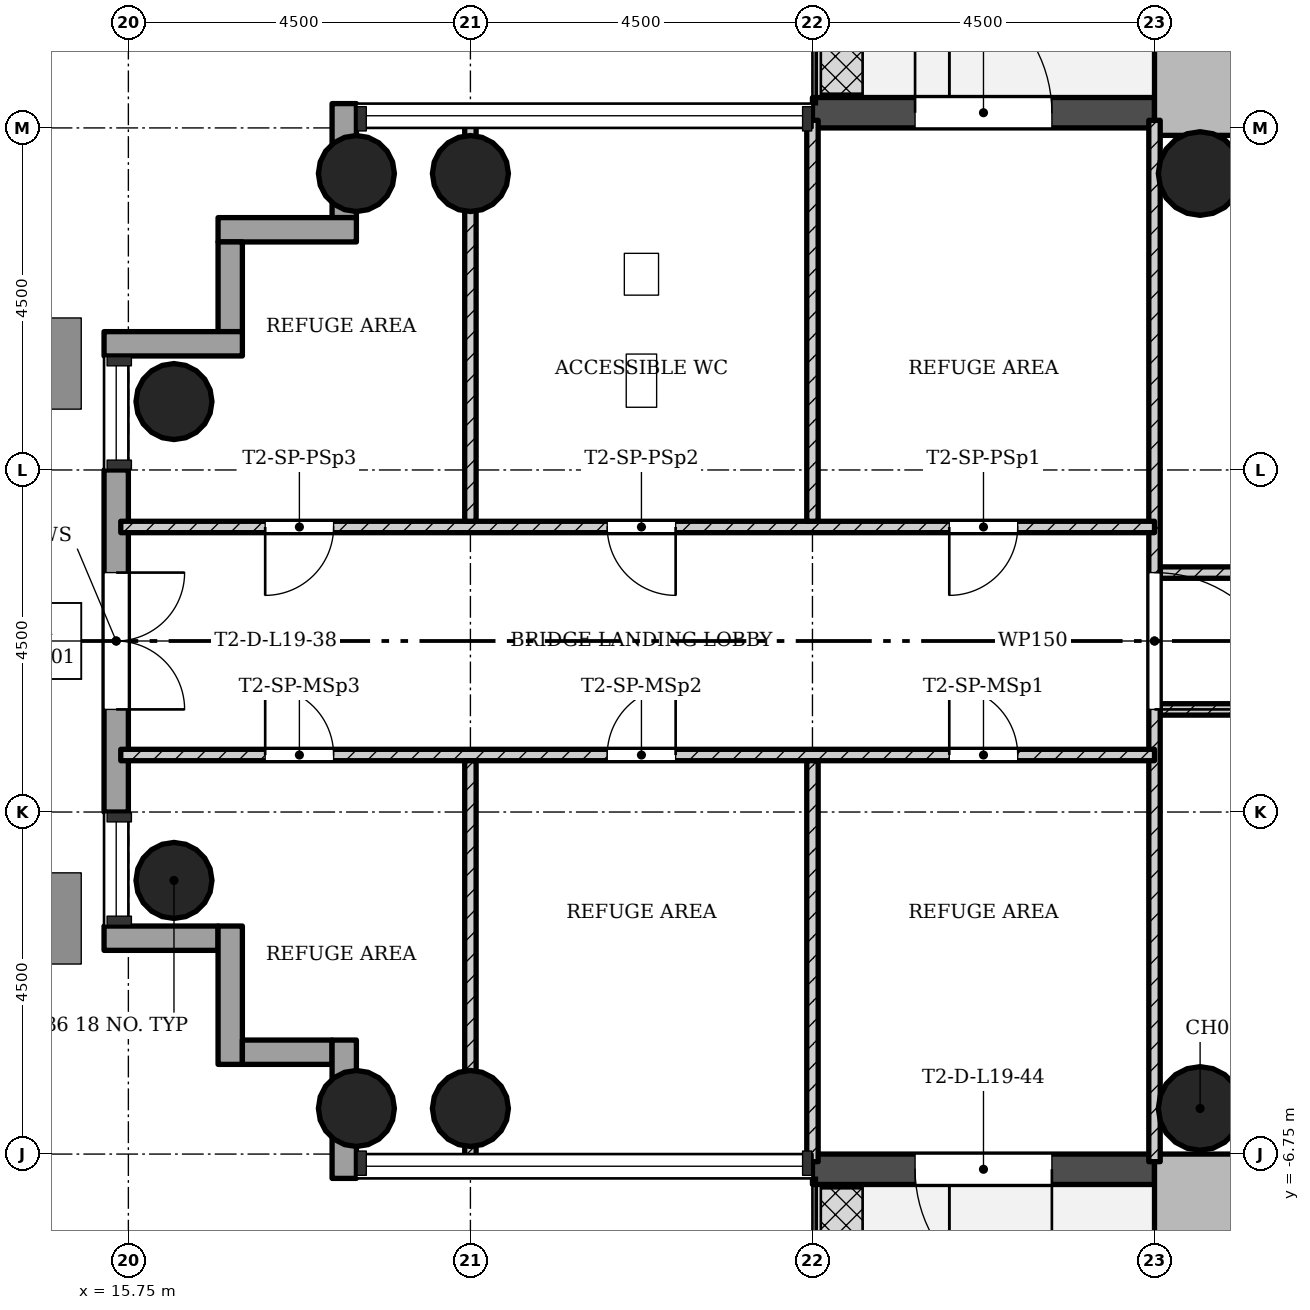
"""IFC4 building model, lengths in metres.
Left out: names, types, materials, properties, quantities, classifications, styles, units other than length and angle.
Written with IfcOpenShell. Run it as: python <this file> out.ifc"""

import sys

from ifc_helpers import new_model, si_unit, direction, frame, frame_2d, origin, origin_2d, place, context, subcontext, project, spatial, rectangle, hollow_circle, extrude, element, fill, save


model = new_model("IFC4")
c1 = context("Model", 3, precision=1e-05, world=origin(), true_north=direction((0.0, 1.0)))
c2 = subcontext(c1, "Body", "Model", "MODEL_VIEW")
j1 = project(units=[si_unit("LENGTHUNIT", "METRE"), si_unit("PLANEANGLEUNIT", "RADIAN")], contexts=[c1])
p1 = place(None, origin())
s1 = spatial("IfcSite", under=j1, at=p1, CompositionType="ELEMENT")
p2 = place(p1, origin())
s2 = spatial("IfcBuilding", under=s1, at=p2, CompositionType="ELEMENT")
p3 = place(p2, frame((0.0, 0.0, 72.1)))
s3 = spatial("IfcBuildingStorey", under=s2, at=p3, CompositionType="ELEMENT", Elevation=72.1)
p4 = place(p3, frame((29.8, 15.248, 0.0), z_axis=(0.0, 0.0, 1.0), x_axis=(0.0, -1.0, 0.0)))
e1 = element("IfcWall", 1, at=p4, inside=s3, PredefinedType="SHEAR", context=c2, shape_type="SweptSolid", body=[
    extrude(rectangle(XDim=8.596, YDim=1.1, at=frame_2d((4.298, 0.0))), origin(), (0.0, 0.0, 1.0), 4.5),
])
p5 = place(p3, frame((41.65, -7.3, 0.0), z_axis=(0.0, 0.0, 1.0), x_axis=(-1.0, 0.0, 0.0)))
e2 = element("IfcWall", 2, at=p5, inside=s3, PredefinedType="SHEAR", context=c2, shape_type="SweptSolid", body=[
    extrude(rectangle(XDim=12.4, YDim=1.1, at=frame_2d((6.2, 0.0))), origin(), (0.0, 0.0, 1.0), 4.5),
])
p6 = place(p5, frame((4.75, 0.0, 0.0)))
e3 = element("IfcOpeningElement", 3, at=p6, cuts=e2, PredefinedType="OPENING", context=c2, shape_type="SweptSolid", body=[
    extrude(rectangle(XDim=1.8, YDim=2.1, at=frame_2d((0.9, 1.05))), frame((0.0, 0.56, 0.0), z_axis=(0.0, -1.0, 0.0), x_axis=(1.0, 0.0, 0.0)), (0.0, 0.0, 1.0), 1.12),
])
for number, where, z_axis, x_axis in (
    (4, (20.25, 6.15, 0.0), (0.0, 0.0, 1.0), (1.0, 0.0, 0.0)),
    (5, (20.25, -6.15, 0.0), (0.0, 0.0, 1.0), (1.0, 0.0, 0.0)),
    (6, (18.75, 6.15, 0.0), (0.0, 0.0, 1.0), (1.0, 0.0, 0.0)),
    (7, (18.75, -6.15, 0.0), (0.0, 0.0, 1.0), (1.0, 0.0, 0.0)),
    (8, (16.35, 3.15, 0.0), (0.0, 0.0, 1.0), (1.0, 0.0, 0.0)),
    (9, (16.35, -3.15, 0.0), (0.0, 0.0, 1.0), (1.0, 0.0, 0.0)),
):
    element("IfcColumn", number, at=place(p3, frame(where, z_axis=z_axis, x_axis=x_axis)), inside=s3, PredefinedType="COLUMN", context=c2, shape_type="SweptSolid", body=[
        extrude(hollow_circle(Radius=0.5, WallThickness=0.036, at=origin_2d()), origin(), (0.0, 0.0, 1.0), 4.5),
    ])
for number, where, z_axis, x_axis in (
    (10, (29.85, 6.15, 0.0), (0.0, 0.0, 1.0), (1.0, 0.0, 0.0)),
    (11, (29.85, -6.15, 0.0), (0.0, 0.0, 1.0), (1.0, 0.0, 0.0)),
):
    element("IfcColumn", number, at=place(p3, frame(where, z_axis=z_axis, x_axis=x_axis)), inside=s3, PredefinedType="COLUMN", context=c2, shape_type="SweptSolid", body=[
        extrude(hollow_circle(Radius=0.55, WallThickness=0.04, at=origin_2d()), origin(), (0.0, 0.0, 1.0), 4.5),
    ])
p7 = place(p3, frame((29.25, 6.95, -0.02), z_axis=(0.0, 0.0, 1.0), x_axis=(-1.0, 0.0, 0.0)))
e12 = element("IfcWall", 12, at=p7, inside=s3, PredefinedType="STANDARD", context=c2, shape_type="SweptSolid", body=[
    extrude(rectangle(XDim=4.5, YDim=0.4, at=frame_2d((2.25, 0.0))), origin(), (0.0, 0.0, 1.0), 4.22),
])
p8 = place(p7, frame((1.35, 0.0, 0.02)))
e13 = element("IfcOpeningElement", 13, at=p8, cuts=e12, PredefinedType="OPENING", context=c2, shape_type="SweptSolid", body=[
    extrude(rectangle(XDim=1.8, YDim=2.1, at=frame_2d((0.9, 1.05))), frame((0.0, 0.21, 0.0), z_axis=(0.0, -1.0, 0.0), x_axis=(1.0, 0.0, 0.0)), (0.0, 0.0, 1.0), 0.42),
])
p9 = place(p3, frame((18.59, 7.07, -0.3), z_axis=(0.0, 0.0, 1.0), x_axis=(0.0, -1.0, 0.0)))
e14 = element("IfcWall", 14, at=p9, inside=s3, PredefinedType="STANDARD", context=c2, shape_type="SweptSolid", body=[
    extrude(rectangle(XDim=1.5, YDim=0.32, at=frame_2d((0.75, 0.0))), origin(), (0.0, 0.0, 1.0), 4.5),
])
p10 = place(p3, frame((18.75, 5.41, -0.3), z_axis=(0.0, 0.0, 1.0), x_axis=(-1.0, 0.0, 0.0)))
e15 = element("IfcWall", 15, at=p10, inside=s3, PredefinedType="STANDARD", context=c2, shape_type="SweptSolid", body=[
    extrude(rectangle(XDim=1.82, YDim=0.32, at=frame_2d((0.91, 0.0))), origin(), (0.0, 0.0, 1.0), 4.5),
])
p11 = place(p3, frame((17.09, 5.25, -0.3), z_axis=(0.0, 0.0, 1.0), x_axis=(0.0, -1.0, 0.0)))
e16 = element("IfcWall", 16, at=p11, inside=s3, PredefinedType="STANDARD", context=c2, shape_type="SweptSolid", body=[
    extrude(rectangle(XDim=1.18, YDim=0.32, at=frame_2d((0.59, 0.0))), origin(), (0.0, 0.0, 1.0), 4.5),
])
p12 = place(p3, frame((17.25, 3.91, -0.3), z_axis=(0.0, 0.0, 1.0), x_axis=(-1.0, 0.0, 0.0)))
e17 = element("IfcWall", 17, at=p12, inside=s3, PredefinedType="STANDARD", context=c2, shape_type="SweptSolid", body=[
    extrude(rectangle(XDim=1.82, YDim=0.32, at=frame_2d((0.91, 0.0))), origin(), (0.0, 0.0, 1.0), 4.5),
])
p13 = place(p3, frame((15.59, 2.25, 0.0), z_axis=(0.0, 0.0, 1.0), x_axis=(0.0, -1.0, 0.0)))
e18 = element("IfcWall", 18, at=p13, inside=s3, PredefinedType="STANDARD", context=c2, shape_type="SweptSolid", body=[
    extrude(rectangle(XDim=4.5, YDim=0.32, at=frame_2d((2.25, 0.0))), origin(), (0.0, 0.0, 1.0), 4.2),
])
p14 = place(p13, frame((1.35, 0.0, 0.0)))
e19 = element("IfcOpeningElement", 19, at=p14, cuts=e18, PredefinedType="OPENING", context=c2, shape_type="SweptSolid", body=[
    extrude(rectangle(XDim=1.8, YDim=2.1, at=frame_2d((0.9, 1.05))), frame((0.0, 0.17, 0.0), z_axis=(0.0, -1.0, 0.0), x_axis=(1.0, 0.0, 0.0)), (0.0, 0.0, 1.0), 0.34),
])
p15 = place(p3, frame((15.43, -3.91, -0.3), z_axis=(0.0, 0.0, 1.0), x_axis=(1.0, 0.0, 0.0)))
e20 = element("IfcWall", 20, at=p15, inside=s3, PredefinedType="STANDARD", context=c2, shape_type="SweptSolid", body=[
    extrude(rectangle(XDim=1.5, YDim=0.32, at=frame_2d((0.75, 0.0))), origin(), (0.0, 0.0, 1.0), 4.5),
])
p16 = place(p3, frame((17.09, -3.75, -0.3), z_axis=(0.0, 0.0, 1.0), x_axis=(0.0, -1.0, 0.0)))
e21 = element("IfcWall", 21, at=p16, inside=s3, PredefinedType="STANDARD", context=c2, shape_type="SweptSolid", body=[
    extrude(rectangle(XDim=1.82, YDim=0.32, at=frame_2d((0.91, 0.0))), origin(), (0.0, 0.0, 1.0), 4.5),
])
p17 = place(p3, frame((17.25, -5.41, -0.3), z_axis=(0.0, 0.0, 1.0), x_axis=(1.0, 0.0, 0.0)))
e22 = element("IfcWall", 22, at=p17, inside=s3, PredefinedType="STANDARD", context=c2, shape_type="SweptSolid", body=[
    extrude(rectangle(XDim=1.18, YDim=0.32, at=frame_2d((0.59, 0.0))), origin(), (0.0, 0.0, 1.0), 4.5),
])
p18 = place(p3, frame((18.59, -5.25, -0.3), z_axis=(0.0, 0.0, 1.0), x_axis=(0.0, -1.0, 0.0)))
e23 = element("IfcWall", 23, at=p18, inside=s3, PredefinedType="STANDARD", context=c2, shape_type="SweptSolid", body=[
    extrude(rectangle(XDim=1.82, YDim=0.32, at=frame_2d((0.91, 0.0))), origin(), (0.0, 0.0, 1.0), 4.5),
])
p19 = place(p3, frame((24.75, -6.95, -0.02), z_axis=(0.0, 0.0, 1.0), x_axis=(1.0, 0.0, 0.0)))
e24 = element("IfcWall", 24, at=p19, inside=s3, PredefinedType="STANDARD", context=c2, shape_type="SweptSolid", body=[
    extrude(rectangle(XDim=4.5, YDim=0.4, at=frame_2d((2.25, 0.0))), origin(), (0.0, 0.0, 1.0), 4.22),
])
p20 = place(p19, frame((1.35, 0.0, 0.02)))
e25 = element("IfcOpeningElement", 25, at=p20, cuts=e24, PredefinedType="OPENING", context=c2, shape_type="SweptSolid", body=[
    extrude(rectangle(XDim=1.8, YDim=2.1, at=frame_2d((0.9, 1.05))), frame((0.0, 0.21, 0.0), z_axis=(0.0, -1.0, 0.0), x_axis=(1.0, 0.0, 0.0)), (0.0, 0.0, 1.0), 0.42),
])
for number, where, z_axis, x_axis in (
    (26, (35.025, 0.9, 0.0), (0.0, 0.0, 1.0), (-1.0, 0.0, 0.0)),
    (27, (35.025, -0.9, 0.0), (0.0, 0.0, 1.0), (-1.0, 0.0, 0.0)),
):
    element("IfcWall", number, at=place(p3, frame(where, z_axis=z_axis, x_axis=x_axis)), inside=s3, PredefinedType="PARTITIONING", context=c2, shape_type="SweptSolid", body=[
        extrude(rectangle(XDim=5.7, YDim=0.15, at=frame_2d((2.85, 0.0))), origin(), (0.0, 0.0, 1.0), 4.08),
    ])
p21 = place(p3, frame((29.25, -6.85, 0.0), z_axis=(0.0, 0.0, 1.0), x_axis=(0.0, 1.0, 0.0)))
e28 = element("IfcWall", 28, at=p21, inside=s3, PredefinedType="PARTITIONING", context=c2, shape_type="SweptSolid", body=[
    extrude(rectangle(XDim=13.7, YDim=0.15, at=frame_2d((6.85, 0.0))), origin(), (0.0, 0.0, 1.0), 4.08),
])
p22 = place(p21, frame((5.95, 0.0, 0.0)))
e29 = element("IfcOpeningElement", 29, at=p22, cuts=e28, PredefinedType="OPENING", context=c2, shape_type="SweptSolid", body=[
    extrude(rectangle(XDim=1.8, YDim=2.1, at=frame_2d((0.9, 1.05))), frame((0.0, 0.085, 0.0), z_axis=(0.0, -1.0, 0.0), x_axis=(1.0, 0.0, 0.0)), (0.0, 0.0, 1.0), 0.17),
])
p23 = place(p3, frame((29.25, 1.5, 0.0), z_axis=(0.0, 0.0, 1.0), x_axis=(-1.0, 0.0, 0.0)))
e30 = element("IfcWall", 30, at=p23, inside=s3, PredefinedType="PARTITIONING", context=c2, shape_type="SweptSolid", body=[
    extrude(rectangle(XDim=13.6, YDim=0.15, at=frame_2d((6.8, 0.0))), origin(), (0.0, 0.0, 1.0), 4.08),
])
p24 = place(p23, frame((1.8, 0.0, 0.0)))
e31 = element("IfcOpeningElement", 31, at=p24, cuts=e30, PredefinedType="OPENING", context=c2, shape_type="SweptSolid", body=[
    extrude(rectangle(XDim=0.9, YDim=2.1, at=frame_2d((0.45, 1.05))), frame((0.0, 0.085, 0.0), z_axis=(0.0, -1.0, 0.0), x_axis=(1.0, 0.0, 0.0)), (0.0, 0.0, 1.0), 0.17),
])
p25 = place(p23, frame((6.3, 0.0, 0.0)))
e32 = element("IfcOpeningElement", 32, at=p25, cuts=e30, PredefinedType="OPENING", context=c2, shape_type="SweptSolid", body=[
    extrude(rectangle(XDim=0.9, YDim=2.1, at=frame_2d((0.45, 1.05))), frame((0.0, 0.085, 0.0), z_axis=(0.0, -1.0, 0.0), x_axis=(1.0, 0.0, 0.0)), (0.0, 0.0, 1.0), 0.17),
])
p26 = place(p23, frame((10.8, 0.0, 0.0)))
e33 = element("IfcOpeningElement", 33, at=p26, cuts=e30, PredefinedType="OPENING", context=c2, shape_type="SweptSolid", body=[
    extrude(rectangle(XDim=0.9, YDim=2.1, at=frame_2d((0.45, 1.05))), frame((0.0, 0.085, 0.0), z_axis=(0.0, -1.0, 0.0), x_axis=(1.0, 0.0, 0.0)), (0.0, 0.0, 1.0), 0.17),
])
for number, where, z_axis, x_axis in (
    (34, (24.75, 1.575, 0.0), (0.0, 0.0, 1.0), (0.0, 1.0, 0.0)),
    (35, (20.25, 1.575, 0.0), (0.0, 0.0, 1.0), (0.0, 1.0, 0.0)),
):
    element("IfcWall", number, at=place(p3, frame(where, z_axis=z_axis, x_axis=x_axis)), inside=s3, PredefinedType="PARTITIONING", context=c2, shape_type="SweptSolid", body=[
        extrude(rectangle(XDim=5.275, YDim=0.15, at=frame_2d((2.638, 0.0))), origin(), (0.0, 0.0, 1.0), 4.08),
    ])
p27 = place(p3, frame((29.25, -1.5, 0.0), z_axis=(0.0, 0.0, 1.0), x_axis=(-1.0, 0.0, 0.0)))
e36 = element("IfcWall", 36, at=p27, inside=s3, PredefinedType="PARTITIONING", context=c2, shape_type="SweptSolid", body=[
    extrude(rectangle(XDim=13.6, YDim=0.15, at=frame_2d((6.8, 0.0))), origin(), (0.0, 0.0, 1.0), 4.08),
])
p28 = place(p27, frame((1.8, 0.0, 0.0)))
e37 = element("IfcOpeningElement", 37, at=p28, cuts=e36, PredefinedType="OPENING", context=c2, shape_type="SweptSolid", body=[
    extrude(rectangle(XDim=0.9, YDim=2.1, at=frame_2d((0.45, 1.05))), frame((0.0, 0.085, 0.0), z_axis=(0.0, -1.0, 0.0), x_axis=(1.0, 0.0, 0.0)), (0.0, 0.0, 1.0), 0.17),
])
p29 = place(p27, frame((6.3, 0.0, 0.0)))
e38 = element("IfcOpeningElement", 38, at=p29, cuts=e36, PredefinedType="OPENING", context=c2, shape_type="SweptSolid", body=[
    extrude(rectangle(XDim=0.9, YDim=2.1, at=frame_2d((0.45, 1.05))), frame((0.0, 0.085, 0.0), z_axis=(0.0, -1.0, 0.0), x_axis=(1.0, 0.0, 0.0)), (0.0, 0.0, 1.0), 0.17),
])
p30 = place(p27, frame((10.8, 0.0, 0.0)))
e39 = element("IfcOpeningElement", 39, at=p30, cuts=e36, PredefinedType="OPENING", context=c2, shape_type="SweptSolid", body=[
    extrude(rectangle(XDim=0.9, YDim=2.1, at=frame_2d((0.45, 1.05))), frame((0.0, 0.085, 0.0), z_axis=(0.0, -1.0, 0.0), x_axis=(1.0, 0.0, 0.0)), (0.0, 0.0, 1.0), 0.17),
])
for number, where, z_axis, x_axis in (
    (40, (24.75, -1.575, 0.0), (0.0, 0.0, 1.0), (0.0, -1.0, 0.0)),
    (41, (20.25, -1.575, 0.0), (0.0, 0.0, 1.0), (0.0, -1.0, 0.0)),
):
    element("IfcWall", number, at=place(p3, frame(where, z_axis=z_axis, x_axis=x_axis)), inside=s3, PredefinedType="PARTITIONING", context=c2, shape_type="SweptSolid", body=[
        extrude(rectangle(XDim=5.275, YDim=0.15, at=frame_2d((2.638, 0.0))), origin(), (0.0, 0.0, 1.0), 4.08),
    ])
p31 = place(p8, origin())
e42 = element("IfcDoor", 42, at=p31, inside=s3, OperationType="SINGLE_SWING_RIGHT", PredefinedType="DOOR", context=c2, shape_type="SweptSolid", body=[
    extrude(rectangle(XDim=1.8, YDim=2.1, at=frame_2d((0.9, 1.05))), frame((0.0, 0.025, 0.0), z_axis=(0.0, -1.0, 0.0), x_axis=(1.0, 0.0, 0.0)), (0.0, 0.0, 1.0), 0.05),
])
fill(e13, e42)
p32 = place(p14, origin())
e43 = element("IfcDoor", 43, at=p32, inside=s3, OperationType="DOUBLE_DOOR_SINGLE_SWING", PredefinedType="DOOR", context=c2, shape_type="SweptSolid", body=[
    extrude(rectangle(XDim=1.8, YDim=2.1, at=frame_2d((0.9, 1.05))), frame((0.0, 0.025, 0.0), z_axis=(0.0, -1.0, 0.0), x_axis=(1.0, 0.0, 0.0)), (0.0, 0.0, 1.0), 0.05),
])
fill(e19, e43)
p33 = place(p20, origin())
e44 = element("IfcDoor", 44, at=p33, inside=s3, OperationType="SINGLE_SWING_RIGHT", PredefinedType="DOOR", context=c2, shape_type="SweptSolid", body=[
    extrude(rectangle(XDim=1.8, YDim=2.1, at=frame_2d((0.9, 1.05))), frame((0.0, 0.025, 0.0), z_axis=(0.0, -1.0, 0.0), x_axis=(1.0, 0.0, 0.0)), (0.0, 0.0, 1.0), 0.05),
])
fill(e25, e44)
p34 = place(p22, origin())
e45 = element("IfcDoor", 45, at=p34, inside=s3, OperationType="SINGLE_SWING_LEFT", PredefinedType="DOOR", context=c2, shape_type="SweptSolid", body=[
    extrude(rectangle(XDim=1.8, YDim=2.1, at=frame_2d((0.9, 1.05))), frame((0.0, 0.025, 0.0), z_axis=(0.0, -1.0, 0.0), x_axis=(1.0, 0.0, 0.0)), (0.0, 0.0, 1.0), 0.05),
])
fill(e29, e45)
p35 = place(p24, origin())
e46 = element("IfcDoor", 46, at=p35, inside=s3, OperationType="SINGLE_SWING_LEFT", PredefinedType="DOOR", context=c2, shape_type="SweptSolid", body=[
    extrude(rectangle(XDim=0.9, YDim=2.1, at=frame_2d((0.45, 1.05))), frame((0.0, 0.025, 0.0), z_axis=(0.0, -1.0, 0.0), x_axis=(1.0, 0.0, 0.0)), (0.0, 0.0, 1.0), 0.05),
])
fill(e31, e46)
p36 = place(p25, origin())
e47 = element("IfcDoor", 47, at=p36, inside=s3, OperationType="SINGLE_SWING_RIGHT", PredefinedType="DOOR", context=c2, shape_type="SweptSolid", body=[
    extrude(rectangle(XDim=0.9, YDim=2.1, at=frame_2d((0.45, 1.05))), frame((0.0, 0.025, 0.0), z_axis=(0.0, -1.0, 0.0), x_axis=(1.0, 0.0, 0.0)), (0.0, 0.0, 1.0), 0.05),
])
fill(e32, e47)
p37 = place(p26, origin())
e48 = element("IfcDoor", 48, at=p37, inside=s3, OperationType="SINGLE_SWING_LEFT", PredefinedType="DOOR", context=c2, shape_type="SweptSolid", body=[
    extrude(rectangle(XDim=0.9, YDim=2.1, at=frame_2d((0.45, 1.05))), frame((0.0, 0.025, 0.0), z_axis=(0.0, -1.0, 0.0), x_axis=(1.0, 0.0, 0.0)), (0.0, 0.0, 1.0), 0.05),
])
fill(e33, e48)
p38 = place(p28, origin())
e49 = element("IfcDoor", 49, at=p38, inside=s3, OperationType="SINGLE_SWING_RIGHT", PredefinedType="DOOR", context=c2, shape_type="SweptSolid", body=[
    extrude(rectangle(XDim=0.9, YDim=2.1, at=frame_2d((0.45, 1.05))), frame((0.0, 0.025, 0.0), z_axis=(0.0, -1.0, 0.0), x_axis=(1.0, 0.0, 0.0)), (0.0, 0.0, 1.0), 0.05),
])
fill(e37, e49)
p39 = place(p29, origin())
e50 = element("IfcDoor", 50, at=p39, inside=s3, OperationType="SINGLE_SWING_LEFT", PredefinedType="DOOR", context=c2, shape_type="SweptSolid", body=[
    extrude(rectangle(XDim=0.9, YDim=2.1, at=frame_2d((0.45, 1.05))), frame((0.0, 0.025, 0.0), z_axis=(0.0, -1.0, 0.0), x_axis=(1.0, 0.0, 0.0)), (0.0, 0.0, 1.0), 0.05),
])
fill(e38, e50)
p40 = place(p30, origin())
e51 = element("IfcDoor", 51, at=p40, inside=s3, OperationType="SINGLE_SWING_RIGHT", PredefinedType="DOOR", context=c2, shape_type="SweptSolid", body=[
    extrude(rectangle(XDim=0.9, YDim=2.1, at=frame_2d((0.45, 1.05))), frame((0.0, 0.025, 0.0), z_axis=(0.0, -1.0, 0.0), x_axis=(1.0, 0.0, 0.0)), (0.0, 0.0, 1.0), 0.05),
])
fill(e39, e51)
save(model, sys.argv[1])
